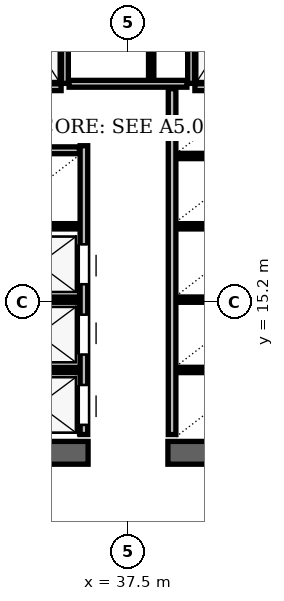
"""IFC4 building model, lengths in metres.
Left out: names, types, materials, properties, quantities, classifications, styles, units other than length and angle.
Written with IfcOpenShell. Run it as: python <this file> out.ifc"""

import sys

from ifc_helpers import new_model, si_unit, direction, frame, frame_2d, origin, place, context, subcontext, project, spatial, rectangle, extrude, element, fill, save


model = new_model("IFC4")
c1 = context("Model", 3, precision=1e-05, world=origin(), true_north=direction((0.0, 1.0)))
c2 = subcontext(c1, "Body", "Model", "MODEL_VIEW")
j1 = project(units=[si_unit("LENGTHUNIT", "METRE"), si_unit("PLANEANGLEUNIT", "RADIAN")], contexts=[c1])
p1 = place(None, origin())
s1 = spatial("IfcSite", under=j1, at=p1, CompositionType="ELEMENT")
p2 = place(p1, origin())
s2 = spatial("IfcBuilding", under=s1, at=p2, CompositionType="ELEMENT")
p3 = place(p2, frame((0.0, 0.0, 9.9)))
s3 = spatial("IfcBuildingStorey", under=s2, at=p3, CompositionType="ELEMENT", Elevation=9.9)
for number, where, z_axis, x_axis in (
    (1, (29.35, 11.24, 0.0), (0.0, 0.0, 1.0), (1.0, 0.0, 0.0)),
    (2, (38.55, 11.24, 0.0), (0.0, 0.0, 1.0), (1.0, 0.0, 0.0)),
):
    element("IfcWall", number, at=place(p3, frame(where, z_axis=z_axis, x_axis=x_axis)), inside=s3, PredefinedType="SHEAR", context=c2, shape_type="SweptSolid", body=[
        extrude(rectangle(XDim=7.1, YDim=0.6, at=frame_2d((3.55, 0.0))), origin(), (0.0, 0.0, 1.0), 3.92),
    ])
p4 = place(p3, frame((35.84, 20.96, 0.0), z_axis=(0.0, 0.0, 1.0), x_axis=(0.0, 1.0, 0.0)))
e3 = element("IfcWall", 3, at=p4, inside=s3, PredefinedType="PARTITIONING", context=c2, shape_type="SweptSolid", body=[
    extrude(rectangle(XDim=3.02, YDim=0.18, at=frame_2d((1.51, 0.0))), origin(), (0.0, 0.0, 1.0), 2.96),
])
p5 = place(p3, frame((34.16, 20.86, 0.0), z_axis=(0.0, 0.0, 1.0), x_axis=(1.0, 0.0, 0.0)))
e4 = element("IfcWall", 4, at=p5, inside=s3, PredefinedType="PARTITIONING", context=c2, shape_type="SweptSolid", body=[
    extrude(rectangle(XDim=1.58, YDim=0.18, at=frame_2d((0.79, 0.0))), origin(), (0.0, 0.0, 1.0), 3.92),
])
p6 = place(p3, frame((39.16, 20.96, 0.0), z_axis=(0.0, 0.0, 1.0), x_axis=(0.0, 1.0, 0.0)))
e5 = element("IfcWall", 5, at=p6, inside=s3, PredefinedType="PARTITIONING", context=c2, shape_type="SweptSolid", body=[
    extrude(rectangle(XDim=3.02, YDim=0.18, at=frame_2d((1.51, 0.0))), origin(), (0.0, 0.0, 1.0), 2.96),
])
p7 = place(p3, frame((39.26, 20.86, 0.0), z_axis=(0.0, 0.0, 1.0), x_axis=(1.0, 0.0, 0.0)))
e6 = element("IfcWall", 6, at=p7, inside=s3, PredefinedType="PARTITIONING", context=c2, shape_type="SweptSolid", body=[
    extrude(rectangle(XDim=1.58, YDim=0.18, at=frame_2d((0.79, 0.0))), origin(), (0.0, 0.0, 1.0), 3.92),
])
p8 = place(p3, frame((36.34, 11.72, 0.0), z_axis=(0.0, 0.0, 1.0), x_axis=(0.0, 1.0, 0.0)))
e7 = element("IfcWall", 7, at=p8, inside=s3, PredefinedType="PARTITIONING", context=c2, shape_type="SweptSolid", body=[
    extrude(rectangle(XDim=7.6, YDim=0.2, at=frame_2d((3.8, 0.0))), origin(), (0.0, 0.0, 1.0), 3.92),
])
p9 = place(p8, frame((0.255, 0.0, 0.0)))
e8 = element("IfcOpeningElement", 8, at=p9, cuts=e7, PredefinedType="OPENING", context=c2, shape_type="SweptSolid", body=[
    extrude(rectangle(XDim=1.05, YDim=2.15, at=frame_2d((0.525, 1.075))), frame((0.0, 0.1, 0.0), z_axis=(0.0, -1.0, 0.0), x_axis=(1.0, 0.0, 0.0)), (0.0, 0.0, 1.0), 0.2),
])
p10 = place(p8, frame((2.105, 0.0, 0.0)))
e9 = element("IfcOpeningElement", 9, at=p10, cuts=e7, PredefinedType="OPENING", context=c2, shape_type="SweptSolid", body=[
    extrude(rectangle(XDim=1.05, YDim=2.15, at=frame_2d((0.525, 1.075))), frame((0.0, 0.1, 0.0), z_axis=(0.0, -1.0, 0.0), x_axis=(1.0, 0.0, 0.0)), (0.0, 0.0, 1.0), 0.2),
])
p11 = place(p8, frame((3.955, 0.0, 0.0)))
e10 = element("IfcOpeningElement", 10, at=p11, cuts=e7, PredefinedType="OPENING", context=c2, shape_type="SweptSolid", body=[
    extrude(rectangle(XDim=1.05, YDim=2.15, at=frame_2d((0.525, 1.075))), frame((0.0, 0.1, 0.0), z_axis=(0.0, -1.0, 0.0), x_axis=(1.0, 0.0, 0.0)), (0.0, 0.0, 1.0), 0.2),
])
p12 = place(p3, frame((33.95, 19.2, 0.0), z_axis=(0.0, 0.0, 1.0), x_axis=(1.0, 0.0, 0.0)))
e11 = element("IfcWall", 11, at=p12, inside=s3, PredefinedType="PARTITIONING", context=c2, shape_type="SweptSolid", body=[
    extrude(rectangle(XDim=2.27, YDim=0.18, at=frame_2d((1.135, 0.0))), origin(), (0.0, 0.0, 1.0), 3.92),
])
for number, where, z_axis, x_axis in (
    (12, (33.56, 13.42, 0.0), (0.0, 0.0, 1.0), (1.0, 0.0, 0.0)),
    (13, (33.56, 15.27, 0.0), (0.0, 0.0, 1.0), (1.0, 0.0, 0.0)),
    (14, (33.56, 17.2, 0.0), (0.0, 0.0, 1.0), (1.0, 0.0, 0.0)),
):
    element("IfcWall", number, at=place(p3, frame(where, z_axis=z_axis, x_axis=x_axis)), inside=s3, PredefinedType="PARTITIONING", context=c2, shape_type="SweptSolid", body=[
        extrude(rectangle(XDim=2.66, YDim=0.14, at=frame_2d((1.33, 0.0))), origin(), (0.0, 0.0, 1.0), 3.92),
    ])
p13 = place(p3, frame((38.66, 11.72, 0.0), z_axis=(0.0, 0.0, 1.0), x_axis=(0.0, 1.0, 0.0)))
e15 = element("IfcWall", 15, at=p13, inside=s3, PredefinedType="PARTITIONING", context=c2, shape_type="SweptSolid", body=[
    extrude(rectangle(XDim=9.1, YDim=0.2, at=frame_2d((4.55, 0.0))), origin(), (0.0, 0.0, 1.0), 3.92),
])
for number, where, z_axis, x_axis in (
    (16, (38.78, 13.42, 0.0), (0.0, 0.0, 1.0), (1.0, 0.0, 0.0)),
    (17, (38.78, 15.27, 0.0), (0.0, 0.0, 1.0), (1.0, 0.0, 0.0)),
    (18, (38.78, 17.2, 0.0), (0.0, 0.0, 1.0), (1.0, 0.0, 0.0)),
    (19, (38.78, 19.05, 0.0), (0.0, 0.0, 1.0), (1.0, 0.0, 0.0)),
):
    element("IfcWall", number, at=place(p3, frame(where, z_axis=z_axis, x_axis=x_axis)), inside=s3, PredefinedType="PARTITIONING", context=c2, shape_type="SweptSolid", body=[
        extrude(rectangle(XDim=2.66, YDim=0.14, at=frame_2d((1.33, 0.0))), origin(), (0.0, 0.0, 1.0), 3.92),
    ])
p14 = place(p3, frame((35.95, 20.95, 0.0), z_axis=(0.0, 0.0, 1.0), x_axis=(1.0, 0.0, 0.0)))
e20 = element("IfcWall", 20, at=p14, inside=s3, PredefinedType="PARTITIONING", context=c2, shape_type="SweptSolid", body=[
    extrude(rectangle(XDim=3.1, YDim=0.18, at=frame_2d((1.55, 0.0))), origin(), (0.0, 0.0, 1.0), 3.92),
])
p15 = place(p3, frame((38.11, 21.06, 0.0), z_axis=(0.0, 0.0, 1.0), x_axis=(0.0, 1.0, 0.0)))
e21 = element("IfcWall", 21, at=p15, inside=s3, PredefinedType="PARTITIONING", context=c2, shape_type="SweptSolid", body=[
    extrude(rectangle(XDim=2.92, YDim=0.14, at=frame_2d((1.46, 0.0))), origin(), (0.0, 0.0, 1.0), 2.96),
])
p16 = place(p9, origin())
e22 = element("IfcDoor", 22, at=p16, inside=s3, OperationType="SLIDING_TO_LEFT", PredefinedType="DOOR", context=c2, shape_type="SweptSolid", body=[
    extrude(rectangle(XDim=1.05, YDim=2.15, at=frame_2d((0.525, 1.075))), frame((0.0, 0.025, 0.0), z_axis=(0.0, -1.0, 0.0), x_axis=(1.0, 0.0, 0.0)), (0.0, 0.0, 1.0), 0.05),
])
fill(e8, e22)
p17 = place(p10, origin())
e23 = element("IfcDoor", 23, at=p17, inside=s3, OperationType="SLIDING_TO_RIGHT", PredefinedType="DOOR", context=c2, shape_type="SweptSolid", body=[
    extrude(rectangle(XDim=1.05, YDim=2.15, at=frame_2d((0.525, 1.075))), frame((0.0, 0.025, 0.0), z_axis=(0.0, -1.0, 0.0), x_axis=(1.0, 0.0, 0.0)), (0.0, 0.0, 1.0), 0.05),
])
fill(e9, e23)
p18 = place(p11, origin())
e24 = element("IfcDoor", 24, at=p18, inside=s3, OperationType="SLIDING_TO_LEFT", PredefinedType="DOOR", context=c2, shape_type="SweptSolid", body=[
    extrude(rectangle(XDim=1.05, YDim=2.15, at=frame_2d((0.525, 1.075))), frame((0.0, 0.025, 0.0), z_axis=(0.0, -1.0, 0.0), x_axis=(1.0, 0.0, 0.0)), (0.0, 0.0, 1.0), 0.05),
])
fill(e10, e24)
save(model, sys.argv[1])
